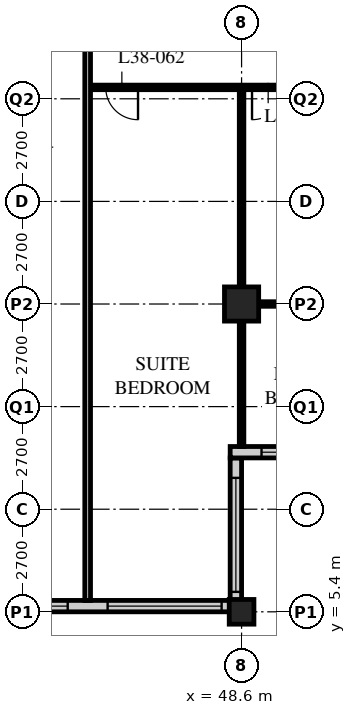
"""IFC4 building model, lengths in metres.
Left out: names, types, materials, properties, quantities, classifications, styles, units other than length and angle.
Written with IfcOpenShell. Run it as: python <this file> out.ifc"""

import sys

from ifc_helpers import new_model, si_unit, direction, frame, frame_2d, origin, origin_2d, place, context, subcontext, project, spatial, rectangle, hollow_rectangle, extrude, element, fill, save


model = new_model("IFC4")
c1 = context("Model", 3, precision=1e-05, world=origin(), true_north=direction((0.0, 1.0)))
c2 = subcontext(c1, "Body", "Model", "MODEL_VIEW")
j1 = project(units=[si_unit("LENGTHUNIT", "METRE"), si_unit("PLANEANGLEUNIT", "RADIAN")], contexts=[c1])
p1 = place(None, origin())
s1 = spatial("IfcSite", under=j1, at=p1, CompositionType="ELEMENT")
p2 = place(p1, origin())
s2 = spatial("IfcBuilding", under=s1, at=p2, CompositionType="ELEMENT")
p3 = place(p2, frame((0.0, 0.0, 147.6)))
s3 = spatial("IfcBuildingStorey", under=s2, at=p3, CompositionType="ELEMENT", Elevation=147.6)
p4 = place(p3, frame((48.6, 5.4, 0.0), z_axis=(0.0, 0.0, 1.0), x_axis=(1.0, 0.0, 0.0)))
e1 = element("IfcColumn", 1, at=p4, inside=s3, PredefinedType="COLUMN", context=c2, shape_type="SweptSolid", body=[
    extrude(hollow_rectangle(XDim=0.65, YDim=0.65, WallThickness=0.055, at=origin_2d()), origin(), (0.0, 0.0, 1.0), 3.4),
])
p5 = place(p3, frame((48.6, 13.5, 0.0), z_axis=(0.0, 0.0, 1.0), x_axis=(1.0, 0.0, 0.0)))
e2 = element("IfcColumn", 2, at=p5, inside=s3, PredefinedType="COLUMN", context=c2, shape_type="SweptSolid", body=[
    extrude(hollow_rectangle(XDim=0.9, YDim=0.9, WallThickness=0.1, at=origin_2d()), origin(), (0.0, 0.0, 1.0), 3.4),
])
p6 = place(p3, frame((8.4, 5.55, 0.0), z_axis=(0.0, 0.0, 1.0), x_axis=(1.0, 0.0, 0.0)))
e3 = element("IfcWall", 3, at=p6, inside=s3, PredefinedType="SOLIDWALL", context=c2, shape_type="SweptSolid", body=[
    extrude(rectangle(XDim=40.2, YDim=0.3, at=frame_2d((20.1, 0.0))), origin(), (0.0, 0.0, 1.0), 3.19),
])
p7 = place(p6, frame((0.225, 0.0, 0.9)))
e4 = element("IfcOpeningElement", 4, at=p7, cuts=e3, PredefinedType="OPENING", context=c2, shape_type="SweptSolid", body=[
    extrude(rectangle(XDim=3.0, YDim=1.4, at=frame_2d((1.5, 0.7))), frame((0.0, 0.16, 0.0), z_axis=(0.0, -1.0, 0.0), x_axis=(1.0, 0.0, 0.0)), (0.0, 0.0, 1.0), 0.32),
])
p8 = place(p6, frame((4.275, 0.0, 0.9)))
e5 = element("IfcOpeningElement", 5, at=p8, cuts=e3, PredefinedType="OPENING", context=c2, shape_type="SweptSolid", body=[
    extrude(rectangle(XDim=3.0, YDim=1.4, at=frame_2d((1.5, 0.7))), frame((0.0, 0.16, 0.0), z_axis=(0.0, -1.0, 0.0), x_axis=(1.0, 0.0, 0.0)), (0.0, 0.0, 1.0), 0.32),
])
p9 = place(p6, frame((8.325, 0.0, 0.9)))
e6 = element("IfcOpeningElement", 6, at=p9, cuts=e3, PredefinedType="OPENING", context=c2, shape_type="SweptSolid", body=[
    extrude(rectangle(XDim=3.0, YDim=1.4, at=frame_2d((1.5, 0.7))), frame((0.0, 0.16, 0.0), z_axis=(0.0, -1.0, 0.0), x_axis=(1.0, 0.0, 0.0)), (0.0, 0.0, 1.0), 0.32),
])
p10 = place(p6, frame((12.375, 0.0, 0.9)))
e7 = element("IfcOpeningElement", 7, at=p10, cuts=e3, PredefinedType="OPENING", context=c2, shape_type="SweptSolid", body=[
    extrude(rectangle(XDim=3.0, YDim=1.4, at=frame_2d((1.5, 0.7))), frame((0.0, 0.16, 0.0), z_axis=(0.0, -1.0, 0.0), x_axis=(1.0, 0.0, 0.0)), (0.0, 0.0, 1.0), 0.32),
])
p11 = place(p6, frame((16.425, 0.0, 0.9)))
e8 = element("IfcOpeningElement", 8, at=p11, cuts=e3, PredefinedType="OPENING", context=c2, shape_type="SweptSolid", body=[
    extrude(rectangle(XDim=3.0, YDim=1.4, at=frame_2d((1.5, 0.7))), frame((0.0, 0.16, 0.0), z_axis=(0.0, -1.0, 0.0), x_axis=(1.0, 0.0, 0.0)), (0.0, 0.0, 1.0), 0.32),
])
p12 = place(p6, frame((20.475, 0.0, 0.9)))
e9 = element("IfcOpeningElement", 9, at=p12, cuts=e3, PredefinedType="OPENING", context=c2, shape_type="SweptSolid", body=[
    extrude(rectangle(XDim=3.0, YDim=1.4, at=frame_2d((1.5, 0.7))), frame((0.0, 0.16, 0.0), z_axis=(0.0, -1.0, 0.0), x_axis=(1.0, 0.0, 0.0)), (0.0, 0.0, 1.0), 0.32),
])
p13 = place(p6, frame((24.525, 0.0, 0.9)))
e10 = element("IfcOpeningElement", 10, at=p13, cuts=e3, PredefinedType="OPENING", context=c2, shape_type="SweptSolid", body=[
    extrude(rectangle(XDim=3.0, YDim=1.4, at=frame_2d((1.5, 0.7))), frame((0.0, 0.16, 0.0), z_axis=(0.0, -1.0, 0.0), x_axis=(1.0, 0.0, 0.0)), (0.0, 0.0, 1.0), 0.32),
])
p14 = place(p6, frame((28.575, 0.0, 0.9)))
e11 = element("IfcOpeningElement", 11, at=p14, cuts=e3, PredefinedType="OPENING", context=c2, shape_type="SweptSolid", body=[
    extrude(rectangle(XDim=3.0, YDim=1.4, at=frame_2d((1.5, 0.7))), frame((0.0, 0.16, 0.0), z_axis=(0.0, -1.0, 0.0), x_axis=(1.0, 0.0, 0.0)), (0.0, 0.0, 1.0), 0.32),
])
p15 = place(p6, frame((32.625, 0.0, 0.9)))
e12 = element("IfcOpeningElement", 12, at=p15, cuts=e3, PredefinedType="OPENING", context=c2, shape_type="SweptSolid", body=[
    extrude(rectangle(XDim=3.0, YDim=1.4, at=frame_2d((1.5, 0.7))), frame((0.0, 0.16, 0.0), z_axis=(0.0, -1.0, 0.0), x_axis=(1.0, 0.0, 0.0)), (0.0, 0.0, 1.0), 0.32),
])
p16 = place(p6, frame((36.675, 0.0, 0.9)))
e13 = element("IfcOpeningElement", 13, at=p16, cuts=e3, PredefinedType="OPENING", context=c2, shape_type="SweptSolid", body=[
    extrude(rectangle(XDim=3.0, YDim=1.4, at=frame_2d((1.5, 0.7))), frame((0.0, 0.16, 0.0), z_axis=(0.0, -1.0, 0.0), x_axis=(1.0, 0.0, 0.0)), (0.0, 0.0, 1.0), 0.32),
])
p17 = place(p3, frame((48.45, 5.7, 0.0), z_axis=(0.0, 0.0, 1.0), x_axis=(0.0, 1.0, 0.0)))
e14 = element("IfcWall", 14, at=p17, inside=s3, PredefinedType="SOLIDWALL", context=c2, shape_type="SweptSolid", body=[
    extrude(rectangle(XDim=3.75, YDim=0.3, at=frame_2d((1.875, 0.0))), origin(), (0.0, 0.0, 1.0), 3.19),
])
p18 = place(p17, frame((0.225, 0.0, 0.9)))
e15 = element("IfcOpeningElement", 15, at=p18, cuts=e14, PredefinedType="OPENING", context=c2, shape_type="SweptSolid", body=[
    extrude(rectangle(XDim=3.0, YDim=1.4, at=frame_2d((1.5, 0.7))), frame((0.0, 0.16, 0.0), z_axis=(0.0, -1.0, 0.0), x_axis=(1.0, 0.0, 0.0)), (0.0, 0.0, 1.0), 0.32),
])
p19 = place(p3, frame((48.3, 9.6, 0.0), z_axis=(0.0, 0.0, 1.0), x_axis=(1.0, 0.0, 0.0)))
e16 = element("IfcWall", 16, at=p19, inside=s3, PredefinedType="SOLIDWALL", context=c2, shape_type="SweptSolid", body=[
    extrude(rectangle(XDim=4.35, YDim=0.3, at=frame_2d((2.175, 0.0))), origin(), (0.0, 0.0, 1.0), 3.19),
])
p20 = place(p19, frame((0.825, 0.0, 0.9)))
e17 = element("IfcOpeningElement", 17, at=p20, cuts=e16, PredefinedType="OPENING", context=c2, shape_type="SweptSolid", body=[
    extrude(rectangle(XDim=3.0, YDim=1.4, at=frame_2d((1.5, 0.7))), frame((0.0, 0.16, 0.0), z_axis=(0.0, -1.0, 0.0), x_axis=(1.0, 0.0, 0.0)), (0.0, 0.0, 1.0), 0.32),
])
p21 = place(p3, frame((44.55, 19.2, 0.0), z_axis=(0.0, 0.0, 1.0), x_axis=(1.0, 0.0, 0.0)))
e18 = element("IfcWall", 18, at=p21, inside=s3, PredefinedType="PARTITIONING", context=c2, shape_type="SweptSolid", body=[
    extrude(rectangle(XDim=8.05, YDim=0.12, at=frame_2d((4.025, 0.0))), origin(), (0.0, 0.0, 1.0), 3.19),
])
p22 = place(p21, frame((0.475, 0.0, 0.0)))
e19 = element("IfcOpeningElement", 19, at=p22, cuts=e18, PredefinedType="OPENING", context=c2, shape_type="SweptSolid", body=[
    extrude(rectangle(XDim=0.85, YDim=2.1, at=frame_2d((0.425, 1.05))), frame((0.0, 0.07, 0.0), z_axis=(0.0, -1.0, 0.0), x_axis=(1.0, 0.0, 0.0)), (0.0, 0.0, 1.0), 0.14),
])
p23 = place(p21, frame((4.325, 0.0, 0.0)))
e20 = element("IfcOpeningElement", 20, at=p23, cuts=e18, PredefinedType="OPENING", context=c2, shape_type="SweptSolid", body=[
    extrude(rectangle(XDim=0.85, YDim=2.1, at=frame_2d((0.425, 1.05))), frame((0.0, 0.07, 0.0), z_axis=(0.0, -1.0, 0.0), x_axis=(1.0, 0.0, 0.0)), (0.0, 0.0, 1.0), 0.14),
])
p24 = place(p3, frame((48.6, 19.2, 0.0), z_axis=(0.0, 0.0, 1.0), x_axis=(0.0, -1.0, 0.0)))
e21 = element("IfcWall", 21, at=p24, inside=s3, PredefinedType="PARTITIONING", context=c2, shape_type="SweptSolid", body=[
    extrude(rectangle(XDim=9.45, YDim=0.12, at=frame_2d((4.725, 0.0))), origin(), (0.0, 0.0, 1.0), 2.42),
])
p25 = place(p3, frame((48.6, 13.5, 0.0), z_axis=(0.0, 0.0, 1.0), x_axis=(1.0, 0.0, 0.0)))
e22 = element("IfcWall", 22, at=p25, inside=s3, PredefinedType="PARTITIONING", context=c2, shape_type="SweptSolid", body=[
    extrude(rectangle(XDim=3.75, YDim=0.12, at=frame_2d((1.875, 0.0))), origin(), (0.0, 0.0, 1.0), 2.42),
])
p26 = place(p25, frame((1.875, 0.0, 0.0)))
e23 = element("IfcOpeningElement", 23, at=p26, cuts=e22, PredefinedType="OPENING", context=c2, shape_type="SweptSolid", body=[
    extrude(rectangle(XDim=0.85, YDim=2.1, at=frame_2d((0.425, 1.05))), frame((0.0, 0.07, 0.0), z_axis=(0.0, -1.0, 0.0), x_axis=(1.0, 0.0, 0.0)), (0.0, 0.0, 1.0), 0.14),
])
p27 = place(p3, frame((44.55, 21.6, 0.0), z_axis=(0.0, 0.0, 1.0), x_axis=(0.0, -1.0, 0.0)))
e24 = element("IfcWall", 24, at=p27, inside=s3, PredefinedType="PARTITIONING", context=c2, shape_type="SweptSolid", body=[
    extrude(rectangle(XDim=15.9, YDim=0.15, at=frame_2d((7.95, 0.0))), origin(), (0.0, 0.0, 1.0), 3.19),
])
p28 = place(p15, origin())
e25 = element("IfcWindow", 25, at=p28, inside=s3, PartitioningType="SINGLE_PANEL", PredefinedType="WINDOW", context=c2, shape_type="SweptSolid", body=[
    extrude(rectangle(XDim=3.0, YDim=1.4, at=frame_2d((1.5, 0.7))), frame((0.0, 0.03, 0.0), z_axis=(0.0, -1.0, 0.0), x_axis=(1.0, 0.0, 0.0)), (0.0, 0.0, 1.0), 0.06),
])
fill(e12, e25)
p29 = place(p16, origin())
e26 = element("IfcWindow", 26, at=p29, inside=s3, PartitioningType="SINGLE_PANEL", PredefinedType="WINDOW", context=c2, shape_type="SweptSolid", body=[
    extrude(rectangle(XDim=3.0, YDim=1.4, at=frame_2d((1.5, 0.7))), frame((0.0, 0.03, 0.0), z_axis=(0.0, -1.0, 0.0), x_axis=(1.0, 0.0, 0.0)), (0.0, 0.0, 1.0), 0.06),
])
fill(e13, e26)
p30 = place(p18, origin())
e27 = element("IfcWindow", 27, at=p30, inside=s3, PartitioningType="SINGLE_PANEL", PredefinedType="WINDOW", context=c2, shape_type="SweptSolid", body=[
    extrude(rectangle(XDim=3.0, YDim=1.4, at=frame_2d((1.5, 0.7))), frame((0.0, 0.03, 0.0), z_axis=(0.0, -1.0, 0.0), x_axis=(1.0, 0.0, 0.0)), (0.0, 0.0, 1.0), 0.06),
])
fill(e15, e27)
p31 = place(p20, origin())
e28 = element("IfcWindow", 28, at=p31, inside=s3, PartitioningType="SINGLE_PANEL", PredefinedType="WINDOW", context=c2, shape_type="SweptSolid", body=[
    extrude(rectangle(XDim=3.0, YDim=1.4, at=frame_2d((1.5, 0.7))), frame((0.0, 0.03, 0.0), z_axis=(0.0, -1.0, 0.0), x_axis=(1.0, 0.0, 0.0)), (0.0, 0.0, 1.0), 0.06),
])
fill(e17, e28)
p32 = place(p22, origin())
e29 = element("IfcDoor", 29, at=p32, inside=s3, OperationType="SINGLE_SWING_LEFT", PredefinedType="DOOR", context=c2, shape_type="SweptSolid", body=[
    extrude(rectangle(XDim=0.85, YDim=2.1, at=frame_2d((0.425, 1.05))), frame((0.0, 0.025, 0.0), z_axis=(0.0, -1.0, 0.0), x_axis=(1.0, 0.0, 0.0)), (0.0, 0.0, 1.0), 0.05),
])
fill(e19, e29)
p33 = place(p23, origin())
e30 = element("IfcDoor", 30, at=p33, inside=s3, OperationType="SINGLE_SWING_RIGHT", PredefinedType="DOOR", context=c2, shape_type="SweptSolid", body=[
    extrude(rectangle(XDim=0.85, YDim=2.1, at=frame_2d((0.425, 1.05))), frame((0.0, 0.025, 0.0), z_axis=(0.0, -1.0, 0.0), x_axis=(1.0, 0.0, 0.0)), (0.0, 0.0, 1.0), 0.05),
])
fill(e20, e30)
save(model, sys.argv[1])
